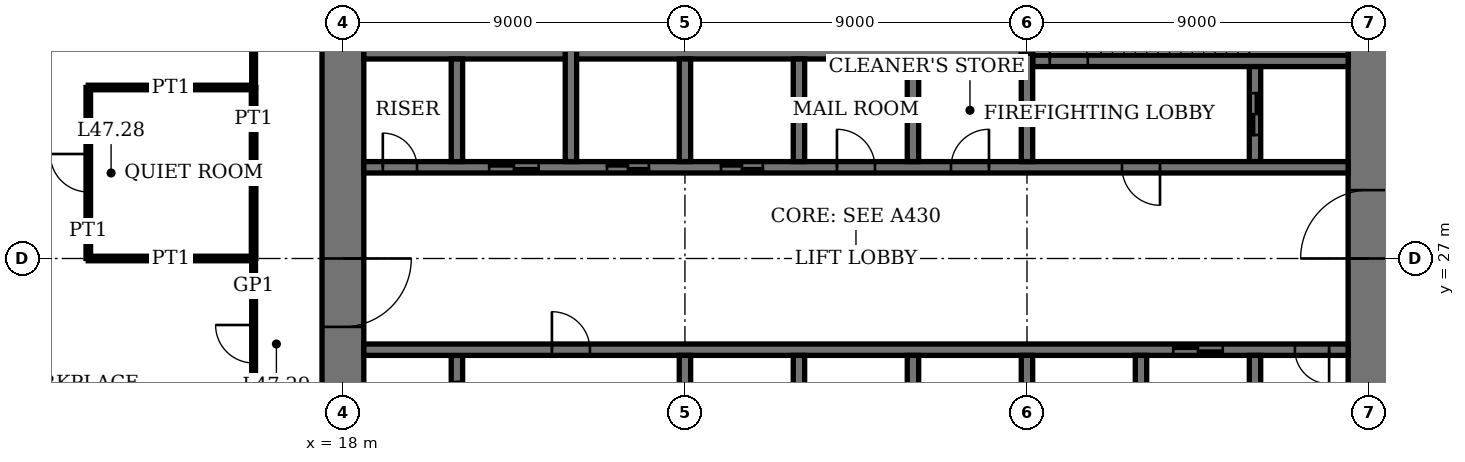
"""IFC4 building model, lengths in metres.
Left out: names, types, materials, properties, quantities, classifications, styles, units other than length and angle.
Written with IfcOpenShell. Run it as: python <this file> out.ifc"""

import sys

from ifc_helpers import new_model, si_unit, direction, frame, frame_2d, origin, place, context, subcontext, project, spatial, rectangle, extrude, element, fill, save


model = new_model("IFC4")
c1 = context("Model", 3, precision=1e-05, world=origin(), true_north=direction((0.0, 1.0)))
c2 = subcontext(c1, "Body", "Model", "MODEL_VIEW")
j1 = project(units=[si_unit("LENGTHUNIT", "METRE"), si_unit("PLANEANGLEUNIT", "RADIAN")], contexts=[c1])
p1 = place(None, origin())
s1 = spatial("IfcSite", under=j1, at=p1, CompositionType="ELEMENT")
p2 = place(p1, origin())
s2 = spatial("IfcBuilding", under=s1, at=p2, CompositionType="ELEMENT")
p3 = place(p2, frame((0.0, 0.0, 194.2)))
s3 = spatial("IfcBuildingStorey", under=s2, at=p3, CompositionType="ELEMENT", Elevation=194.2)
p4 = place(p3, frame((18.0, 35.45, 0.0), z_axis=(0.0, 0.0, 1.0), x_axis=(0.0, -1.0, 0.0)))
e1 = element("IfcWall", 1, at=p4, inside=s3, PredefinedType="SHEAR", context=c2, shape_type="SweptSolid", body=[
    extrude(rectangle(XDim=16.9, YDim=1.1, at=frame_2d((8.45, 0.0))), origin(), (0.0, 0.0, 1.0), 4.0),
])
p5 = place(p4, frame((8.45, 0.0, 0.0)))
e2 = element("IfcOpeningElement", 2, at=p5, cuts=e1, PredefinedType="OPENING", context=c2, shape_type="SweptSolid", body=[
    extrude(rectangle(XDim=1.8, YDim=2.4, at=frame_2d((0.9, 1.2))), frame((0.0, 0.56, 0.0), z_axis=(0.0, -1.0, 0.0), x_axis=(1.0, 0.0, 0.0)), (0.0, 0.0, 1.0), 1.12),
])
p6 = place(p3, frame((45.0, 18.55, 0.0), z_axis=(0.0, 0.0, 1.0), x_axis=(0.0, 1.0, 0.0)))
e3 = element("IfcWall", 3, at=p6, inside=s3, PredefinedType="SHEAR", context=c2, shape_type="SweptSolid", body=[
    extrude(rectangle(XDim=16.9, YDim=1.1, at=frame_2d((8.45, 0.0))), origin(), (0.0, 0.0, 1.0), 4.0),
])
p7 = place(p6, frame((8.45, 0.0, 0.0)))
e4 = element("IfcOpeningElement", 4, at=p7, cuts=e3, PredefinedType="OPENING", context=c2, shape_type="SweptSolid", body=[
    extrude(rectangle(XDim=1.8, YDim=2.4, at=frame_2d((0.9, 1.2))), frame((0.0, 0.56, 0.0), z_axis=(0.0, -1.0, 0.0), x_axis=(1.0, 0.0, 0.0)), (0.0, 0.0, 1.0), 1.12),
])
p8 = place(p3, frame((36.15, 32.2, 0.0), z_axis=(0.0, 0.0, 1.0), x_axis=(1.0, 0.0, 0.0)))
e5 = element("IfcWall", 5, at=p8, inside=s3, PredefinedType="SHEAR", context=c2, shape_type="SweptSolid", body=[
    extrude(rectangle(XDim=8.3, YDim=0.3, at=frame_2d((4.15, 0.0))), origin(), (0.0, 0.0, 1.0), 4.0),
])
p9 = place(p8, frame((0.45, 0.0, 0.0)))
e6 = element("IfcOpeningElement", 6, at=p9, cuts=e5, PredefinedType="OPENING", context=c2, shape_type="SweptSolid", body=[
    extrude(rectangle(XDim=1.0, YDim=2.4, at=frame_2d((0.5, 1.2))), frame((0.0, 0.16, 0.0), z_axis=(0.0, -1.0, 0.0), x_axis=(1.0, 0.0, 0.0)), (0.0, 0.0, 1.0), 0.32),
])
p10 = place(p3, frame((36.0, 32.4, 0.0), z_axis=(0.0, 0.0, 1.0), x_axis=(0.0, 1.0, 0.0)))
e7 = element("IfcWall", 7, at=p10, inside=s3, PredefinedType="SHEAR", context=c2, shape_type="SweptSolid", body=[
    extrude(rectangle(XDim=3.05, YDim=0.3, at=frame_2d((1.525, 0.0))), origin(), (0.0, 0.0, 1.0), 4.0),
])
p11 = place(p3, frame((21.0, 21.95, 0.0), z_axis=(0.0, 0.0, 1.0), x_axis=(0.0, 1.0, 0.0)))
e8 = element("IfcWall", 8, at=p11, inside=s3, PredefinedType="SHEAR", context=c2, shape_type="SweptSolid", body=[
    extrude(rectangle(XDim=2.5, YDim=0.3, at=frame_2d((1.25, 0.0))), origin(), (0.0, 0.0, 1.0), 4.0),
])
p12 = place(p11, frame((0.7, 0.0, 0.0)))
e9 = element("IfcOpeningElement", 9, at=p12, cuts=e8, PredefinedType="OPENING", context=c2, shape_type="SweptSolid", body=[
    extrude(rectangle(XDim=1.1, YDim=2.4, at=frame_2d((0.55, 1.2))), frame((0.0, 0.16, 0.0), z_axis=(0.0, -1.0, 0.0), x_axis=(1.0, 0.0, 0.0)), (0.0, 0.0, 1.0), 0.32),
])
p13 = place(p3, frame((42.0, 29.55, 0.0), z_axis=(0.0, 0.0, 1.0), x_axis=(0.0, 1.0, 0.0)))
e10 = element("IfcWall", 10, at=p13, inside=s3, PredefinedType="SHEAR", context=c2, shape_type="SweptSolid", body=[
    extrude(rectangle(XDim=2.5, YDim=0.3, at=frame_2d((1.25, 0.0))), origin(), (0.0, 0.0, 1.0), 4.0),
])
p14 = place(p13, frame((0.7, 0.0, 0.0)))
e11 = element("IfcOpeningElement", 11, at=p14, cuts=e10, PredefinedType="OPENING", context=c2, shape_type="SweptSolid", body=[
    extrude(rectangle(XDim=1.1, YDim=2.4, at=frame_2d((0.55, 1.2))), frame((0.0, 0.16, 0.0), z_axis=(0.0, -1.0, 0.0), x_axis=(1.0, 0.0, 0.0)), (0.0, 0.0, 1.0), 0.32),
])
p15 = place(p3, frame((18.55, 24.6, 0.0), z_axis=(0.0, 0.0, 1.0), x_axis=(1.0, 0.0, 0.0)))
e12 = element("IfcWall", 12, at=p15, inside=s3, PredefinedType="SHEAR", context=c2, shape_type="SweptSolid", body=[
    extrude(rectangle(XDim=25.9, YDim=0.3, at=frame_2d((12.95, 0.0))), origin(), (0.0, 0.0, 1.0), 4.0),
])
p16 = place(p15, frame((4.95, 0.0, 0.0)))
e13 = element("IfcOpeningElement", 13, at=p16, cuts=e12, PredefinedType="OPENING", context=c2, shape_type="SweptSolid", body=[
    extrude(rectangle(XDim=1.0, YDim=2.4, at=frame_2d((0.5, 1.2))), frame((0.0, 0.16, 0.0), z_axis=(0.0, -1.0, 0.0), x_axis=(1.0, 0.0, 0.0)), (0.0, 0.0, 1.0), 0.32),
])
p17 = place(p15, frame((24.5, 0.0, 0.0)))
e14 = element("IfcOpeningElement", 14, at=p17, cuts=e12, PredefinedType="OPENING", context=c2, shape_type="SweptSolid", body=[
    extrude(rectangle(XDim=0.9, YDim=2.1, at=frame_2d((0.45, 1.05))), frame((0.0, 0.16, 0.0), z_axis=(0.0, -1.0, 0.0), x_axis=(1.0, 0.0, 0.0)), (0.0, 0.0, 1.0), 0.32),
])
p18 = place(p15, frame((21.3, 0.0, 0.0)))
e15 = element("IfcOpeningElement", 15, at=p18, cuts=e12, PredefinedType="OPENING", context=c2, shape_type="SweptSolid", body=[
    extrude(rectangle(XDim=1.3, YDim=2.4, at=frame_2d((0.65, 1.2))), frame((0.0, 0.16, 0.0), z_axis=(0.0, -1.0, 0.0), x_axis=(1.0, 0.0, 0.0)), (0.0, 0.0, 1.0), 0.32),
])
p19 = place(p3, frame((18.55, 29.4, 0.0), z_axis=(0.0, 0.0, 1.0), x_axis=(1.0, 0.0, 0.0)))
e16 = element("IfcWall", 16, at=p19, inside=s3, PredefinedType="SHEAR", context=c2, shape_type="SweptSolid", body=[
    extrude(rectangle(XDim=25.9, YDim=0.3, at=frame_2d((12.95, 0.0))), origin(), (0.0, 0.0, 1.0), 4.0),
])
p20 = place(p19, frame((19.95, 0.0, 0.0)))
e17 = element("IfcOpeningElement", 17, at=p20, cuts=e16, PredefinedType="OPENING", context=c2, shape_type="SweptSolid", body=[
    extrude(rectangle(XDim=1.0, YDim=2.4, at=frame_2d((0.5, 1.2))), frame((0.0, 0.16, 0.0), z_axis=(0.0, -1.0, 0.0), x_axis=(1.0, 0.0, 0.0)), (0.0, 0.0, 1.0), 0.32),
])
p21 = place(p19, frame((0.5, 0.0, 0.0)))
e18 = element("IfcOpeningElement", 18, at=p21, cuts=e16, PredefinedType="OPENING", context=c2, shape_type="SweptSolid", body=[
    extrude(rectangle(XDim=0.9, YDim=2.1, at=frame_2d((0.45, 1.05))), frame((0.0, 0.16, 0.0), z_axis=(0.0, -1.0, 0.0), x_axis=(1.0, 0.0, 0.0)), (0.0, 0.0, 1.0), 0.32),
])
p22 = place(p19, frame((15.45, 0.0, 0.0)))
e19 = element("IfcOpeningElement", 19, at=p22, cuts=e16, PredefinedType="OPENING", context=c2, shape_type="SweptSolid", body=[
    extrude(rectangle(XDim=1.0, YDim=2.4, at=frame_2d((0.5, 1.2))), frame((0.0, 0.16, 0.0), z_axis=(0.0, -1.0, 0.0), x_axis=(1.0, 0.0, 0.0)), (0.0, 0.0, 1.0), 0.32),
])
p23 = place(p19, frame((12.45, 0.0, 0.0)))
e20 = element("IfcOpeningElement", 20, at=p23, cuts=e16, PredefinedType="OPENING", context=c2, shape_type="SweptSolid", body=[
    extrude(rectangle(XDim=1.0, YDim=2.4, at=frame_2d((0.5, 1.2))), frame((0.0, 0.16, 0.0), z_axis=(0.0, -1.0, 0.0), x_axis=(1.0, 0.0, 0.0)), (0.0, 0.0, 1.0), 0.32),
])
p24 = place(p19, frame((9.4, 0.0, 0.0)))
e21 = element("IfcOpeningElement", 21, at=p24, cuts=e16, PredefinedType="OPENING", context=c2, shape_type="SweptSolid", body=[
    extrude(rectangle(XDim=1.1, YDim=2.4, at=frame_2d((0.55, 1.2))), frame((0.0, 0.16, 0.0), z_axis=(0.0, -1.0, 0.0), x_axis=(1.0, 0.0, 0.0)), (0.0, 0.0, 1.0), 0.32),
])
p25 = place(p19, frame((6.4, 0.0, 0.0)))
e22 = element("IfcOpeningElement", 22, at=p25, cuts=e16, PredefinedType="OPENING", context=c2, shape_type="SweptSolid", body=[
    extrude(rectangle(XDim=1.1, YDim=2.4, at=frame_2d((0.55, 1.2))), frame((0.0, 0.16, 0.0), z_axis=(0.0, -1.0, 0.0), x_axis=(1.0, 0.0, 0.0)), (0.0, 0.0, 1.0), 0.32),
])
p26 = place(p19, frame((3.3, 0.0, 0.0)))
e23 = element("IfcOpeningElement", 23, at=p26, cuts=e16, PredefinedType="OPENING", context=c2, shape_type="SweptSolid", body=[
    extrude(rectangle(XDim=1.3, YDim=2.4, at=frame_2d((0.65, 1.2))), frame((0.0, 0.16, 0.0), z_axis=(0.0, -1.0, 0.0), x_axis=(1.0, 0.0, 0.0)), (0.0, 0.0, 1.0), 0.32),
])
p27 = place(p3, frame((18.55, 32.4, 0.0), z_axis=(0.0, 0.0, 1.0), x_axis=(1.0, 0.0, 0.0)))
e24 = element("IfcWall", 24, at=p27, inside=s3, PredefinedType="SHEAR", context=c2, shape_type="SweptSolid", body=[
    extrude(rectangle(XDim=17.3, YDim=0.3, at=frame_2d((8.65, 0.0))), origin(), (0.0, 0.0, 1.0), 4.0),
])
for number, where, z_axis, x_axis in (
    (25, (30.0, 21.75, 0.0), (0.0, 0.0, 1.0), (0.0, 1.0, 0.0)),
    (26, (33.0, 29.55, 0.0), (0.0, 0.0, 1.0), (0.0, 1.0, 0.0)),
    (27, (33.0, 21.75, 0.0), (0.0, 0.0, 1.0), (0.0, 1.0, 0.0)),
    (28, (30.0, 29.55, 0.0), (0.0, 0.0, 1.0), (0.0, 1.0, 0.0)),
    (29, (36.0, 21.75, 0.0), (0.0, 0.0, 1.0), (0.0, 1.0, 0.0)),
    (30, (27.0, 29.55, 0.0), (0.0, 0.0, 1.0), (0.0, 1.0, 0.0)),
):
    element("IfcWall", number, at=place(p3, frame(where, z_axis=z_axis, x_axis=x_axis)), inside=s3, PredefinedType="SHEAR", context=c2, shape_type="SweptSolid", body=[
        extrude(rectangle(XDim=2.7, YDim=0.3, at=frame_2d((1.35, 0.0))), origin(), (0.0, 0.0, 1.0), 4.0),
    ])
for number, where, z_axis, x_axis in (
    (31, (39.0, 18.55, 0.0), (0.0, 0.0, 1.0), (0.0, 1.0, 0.0)),
    (32, (24.0, 29.55, 0.0), (0.0, 0.0, 1.0), (0.0, 1.0, 0.0)),
):
    element("IfcWall", number, at=place(p3, frame(where, z_axis=z_axis, x_axis=x_axis)), inside=s3, PredefinedType="SHEAR", context=c2, shape_type="SweptSolid", body=[
        extrude(rectangle(XDim=5.9, YDim=0.3, at=frame_2d((2.95, 0.0))), origin(), (0.0, 0.0, 1.0), 4.0),
    ])
for number, where, z_axis, x_axis in (
    (33, (42.0, 21.75, 0.0), (0.0, 0.0, 1.0), (0.0, 1.0, 0.0)),
    (34, (21.0, 29.55, 0.0), (0.0, 0.0, 1.0), (0.0, 1.0, 0.0)),
):
    element("IfcWall", number, at=place(p3, frame(where, z_axis=z_axis, x_axis=x_axis)), inside=s3, PredefinedType="SHEAR", context=c2, shape_type="SweptSolid", body=[
        extrude(rectangle(XDim=2.7, YDim=0.3, at=frame_2d((1.35, 0.0))), origin(), (0.0, 0.0, 1.0), 4.0),
    ])
for number, where, z_axis, x_axis in (
    (35, (27.0, 21.6, 0.0), (0.0, 0.0, 1.0), (0.0, 1.0, 0.0)),
    (36, (36.0, 29.55, 0.0), (0.0, 0.0, 1.0), (0.0, 1.0, 0.0)),
):
    element("IfcWall", number, at=place(p3, frame(where, z_axis=z_axis, x_axis=x_axis)), inside=s3, PredefinedType="SHEAR", context=c2, shape_type="SweptSolid", body=[
        extrude(rectangle(XDim=2.85, YDim=0.3, at=frame_2d((1.425, 0.0))), origin(), (0.0, 0.0, 1.0), 4.0),
    ])
p28 = place(p3, frame((11.3, 27.0, 0.0), z_axis=(0.0, 0.0, 1.0), x_axis=(1.0, 0.0, 0.0)))
e37 = element("IfcWall", 37, at=p28, inside=s3, PredefinedType="PARTITIONING", context=c2, shape_type="SweptSolid", body=[
    extrude(rectangle(XDim=4.35, YDim=0.12, at=frame_2d((2.175, 0.0))), origin(), (0.0, 0.0, 1.0), 3.05),
])
p29 = place(p3, frame((11.3, 31.5, 0.0), z_axis=(0.0, 0.0, 1.0), x_axis=(1.0, 0.0, 0.0)))
e38 = element("IfcWall", 38, at=p29, inside=s3, PredefinedType="PARTITIONING", context=c2, shape_type="SweptSolid", body=[
    extrude(rectangle(XDim=4.35, YDim=0.12, at=frame_2d((2.175, 0.0))), origin(), (0.0, 0.0, 1.0), 3.1),
])
p30 = place(p3, frame((11.3, 27.0, 0.0), z_axis=(0.0, 0.0, 1.0), x_axis=(0.0, 1.0, 0.0)))
e39 = element("IfcWall", 39, at=p30, inside=s3, PredefinedType="PARTITIONING", context=c2, shape_type="SweptSolid", body=[
    extrude(rectangle(XDim=4.5, YDim=0.12, at=frame_2d((2.25, 0.0))), origin(), (0.0, 0.0, 1.0), 3.75),
])
p31 = place(p30, frame((1.75, 0.0, 0.0)))
e40 = element("IfcOpeningElement", 40, at=p31, cuts=e39, PredefinedType="OPENING", context=c2, shape_type="SweptSolid", body=[
    extrude(rectangle(XDim=1.0, YDim=2.4, at=frame_2d((0.5, 1.2))), frame((0.0, 0.07, 0.0), z_axis=(0.0, -1.0, 0.0), x_axis=(1.0, 0.0, 0.0)), (0.0, 0.0, 1.0), 0.14),
])
p32 = place(p3, frame((15.65, 27.0, 0.0), z_axis=(0.0, 0.0, 1.0), x_axis=(0.0, 1.0, 0.0)))
e41 = element("IfcWall", 41, at=p32, inside=s3, PredefinedType="PARTITIONING", context=c2, shape_type="SweptSolid", body=[
    extrude(rectangle(XDim=4.5, YDim=0.12, at=frame_2d((2.25, 0.0))), origin(), (0.0, 0.0, 1.0), 3.75),
])
p33 = place(p3, frame((15.65, 22.5, 0.0), z_axis=(0.0, 0.0, 1.0), x_axis=(0.0, 1.0, 0.0)))
e42 = element("IfcWall", 42, at=p33, inside=s3, PredefinedType="PARTITIONING", context=c2, shape_type="SweptSolid", body=[
    extrude(rectangle(XDim=4.5, YDim=0.1, at=frame_2d((2.25, 0.0))), origin(), (0.0, 0.0, 1.0), 3.75),
])
p34 = place(p33, frame((1.75, 0.0, 0.0)))
e43 = element("IfcOpeningElement", 43, at=p34, cuts=e42, PredefinedType="OPENING", context=c2, shape_type="SweptSolid", body=[
    extrude(rectangle(XDim=1.0, YDim=2.4, at=frame_2d((0.5, 1.2))), frame((0.0, 0.06, 0.0), z_axis=(0.0, -1.0, 0.0), x_axis=(1.0, 0.0, 0.0)), (0.0, 0.0, 1.0), 0.12),
])
p35 = place(p3, frame((15.65, 31.5, 0.0), z_axis=(0.0, 0.0, 1.0), x_axis=(0.0, 1.0, 0.0)))
e44 = element("IfcWall", 44, at=p35, inside=s3, PredefinedType="PARTITIONING", context=c2, shape_type="SweptSolid", body=[
    extrude(rectangle(XDim=6.85, YDim=0.1, at=frame_2d((3.425, 0.0))), origin(), (0.0, 0.0, 1.0), 3.75),
])
p36 = place(p5, origin())
e45 = element("IfcDoor", 45, at=p36, inside=s3, OperationType="DOUBLE_DOOR_DOUBLE_SWING", PredefinedType="DOOR", context=c2, shape_type="SweptSolid", body=[
    extrude(rectangle(XDim=1.8, YDim=2.4, at=frame_2d((0.9, 1.2))), frame((0.0, 0.03, 0.0), z_axis=(0.0, -1.0, 0.0), x_axis=(1.0, 0.0, 0.0)), (0.0, 0.0, 1.0), 0.06),
    extrude(rectangle(XDim=0.04, YDim=2.4, at=frame_2d((0.02, 1.2))), frame((0.0, 0.55, 0.0), z_axis=(0.0, -1.0, 0.0), x_axis=(1.0, 0.0, 0.0)), (0.0, 0.0, 1.0), 1.1),
    extrude(rectangle(XDim=0.04, YDim=2.4, at=frame_2d((1.78, 1.2))), frame((0.0, 0.55, 0.0), z_axis=(0.0, -1.0, 0.0), x_axis=(1.0, 0.0, 0.0)), (0.0, 0.0, 1.0), 1.1),
    extrude(rectangle(XDim=1.8, YDim=0.04, at=frame_2d((0.9, 2.38))), frame((0.0, 0.55, 0.0), z_axis=(0.0, -1.0, 0.0), x_axis=(1.0, 0.0, 0.0)), (0.0, 0.0, 1.0), 1.1),
])
fill(e2, e45)
p37 = place(p7, origin())
e46 = element("IfcDoor", 46, at=p37, inside=s3, OperationType="DOUBLE_DOOR_DOUBLE_SWING", PredefinedType="DOOR", context=c2, shape_type="SweptSolid", body=[
    extrude(rectangle(XDim=1.8, YDim=2.4, at=frame_2d((0.9, 1.2))), frame((0.0, 0.03, 0.0), z_axis=(0.0, -1.0, 0.0), x_axis=(1.0, 0.0, 0.0)), (0.0, 0.0, 1.0), 0.06),
    extrude(rectangle(XDim=0.04, YDim=2.4, at=frame_2d((0.02, 1.2))), frame((0.0, 0.55, 0.0), z_axis=(0.0, -1.0, 0.0), x_axis=(1.0, 0.0, 0.0)), (0.0, 0.0, 1.0), 1.1),
    extrude(rectangle(XDim=0.04, YDim=2.4, at=frame_2d((1.78, 1.2))), frame((0.0, 0.55, 0.0), z_axis=(0.0, -1.0, 0.0), x_axis=(1.0, 0.0, 0.0)), (0.0, 0.0, 1.0), 1.1),
    extrude(rectangle(XDim=1.8, YDim=0.04, at=frame_2d((0.9, 2.38))), frame((0.0, 0.55, 0.0), z_axis=(0.0, -1.0, 0.0), x_axis=(1.0, 0.0, 0.0)), (0.0, 0.0, 1.0), 1.1),
])
fill(e4, e46)
p38 = place(p9, origin())
e47 = element("IfcDoor", 47, at=p38, inside=s3, OperationType="SINGLE_SWING_RIGHT", PredefinedType="DOOR", context=c2, shape_type="SweptSolid", body=[
    extrude(rectangle(XDim=1.0, YDim=2.4, at=frame_2d((0.5, 1.2))), frame((0.0, 0.03, 0.0), z_axis=(0.0, -1.0, 0.0), x_axis=(1.0, 0.0, 0.0)), (0.0, 0.0, 1.0), 0.06),
])
fill(e6, e47)
p39 = place(p16, origin())
e48 = element("IfcDoor", 48, at=p39, inside=s3, OperationType="SINGLE_SWING_RIGHT", PredefinedType="DOOR", context=c2, shape_type="SweptSolid", body=[
    extrude(rectangle(XDim=1.0, YDim=2.4, at=frame_2d((0.5, 1.2))), frame((0.0, 0.03, 0.0), z_axis=(0.0, -1.0, 0.0), x_axis=(1.0, 0.0, 0.0)), (0.0, 0.0, 1.0), 0.06),
])
fill(e13, e48)
p40 = place(p20, origin())
e49 = element("IfcDoor", 49, at=p40, inside=s3, OperationType="SINGLE_SWING_RIGHT", PredefinedType="DOOR", context=c2, shape_type="SweptSolid", body=[
    extrude(rectangle(XDim=1.0, YDim=2.4, at=frame_2d((0.5, 1.2))), frame((0.0, 0.03, 0.0), z_axis=(0.0, -1.0, 0.0), x_axis=(1.0, 0.0, 0.0)), (0.0, 0.0, 1.0), 0.06),
])
fill(e17, e49)
p41 = place(p17, origin())
e50 = element("IfcDoor", 50, at=p41, inside=s3, OperationType="SINGLE_SWING_RIGHT", PredefinedType="DOOR", context=c2, shape_type="SweptSolid", body=[
    extrude(rectangle(XDim=0.9, YDim=2.1, at=frame_2d((0.45, 1.05))), frame((0.0, 0.03, 0.0), z_axis=(0.0, -1.0, 0.0), x_axis=(1.0, 0.0, 0.0)), (0.0, 0.0, 1.0), 0.06),
])
fill(e14, e50)
p42 = place(p21, origin())
e51 = element("IfcDoor", 51, at=p42, inside=s3, OperationType="SINGLE_SWING_RIGHT", PredefinedType="DOOR", context=c2, shape_type="SweptSolid", body=[
    extrude(rectangle(XDim=0.9, YDim=2.1, at=frame_2d((0.45, 1.05))), frame((0.0, 0.03, 0.0), z_axis=(0.0, -1.0, 0.0), x_axis=(1.0, 0.0, 0.0)), (0.0, 0.0, 1.0), 0.06),
])
fill(e18, e51)
p43 = place(p31, origin())
e52 = element("IfcDoor", 52, at=p43, inside=s3, OperationType="SINGLE_SWING_LEFT", PredefinedType="DOOR", context=c2, shape_type="SweptSolid", body=[
    extrude(rectangle(XDim=1.0, YDim=2.4, at=frame_2d((0.5, 1.2))), frame((0.0, 0.025, 0.0), z_axis=(0.0, -1.0, 0.0), x_axis=(1.0, 0.0, 0.0)), (0.0, 0.0, 1.0), 0.05),
])
fill(e40, e52)
p44 = place(p34, origin())
e53 = element("IfcDoor", 53, at=p44, inside=s3, OperationType="SINGLE_SWING_LEFT", PredefinedType="DOOR", context=c2, shape_type="SweptSolid", body=[
    extrude(rectangle(XDim=1.0, YDim=2.4, at=frame_2d((0.5, 1.2))), frame((0.0, 0.02, 0.0), z_axis=(0.0, -1.0, 0.0), x_axis=(1.0, 0.0, 0.0)), (0.0, 0.0, 1.0), 0.04),
])
fill(e43, e53)
p45 = place(p22, origin())
e54 = element("IfcDoor", 54, at=p45, inside=s3, OperationType="SINGLE_SWING_LEFT", PredefinedType="DOOR", context=c2, shape_type="SweptSolid", body=[
    extrude(rectangle(XDim=1.0, YDim=2.4, at=frame_2d((0.5, 1.2))), frame((0.0, 0.03, 0.0), z_axis=(0.0, -1.0, 0.0), x_axis=(1.0, 0.0, 0.0)), (0.0, 0.0, 1.0), 0.06),
])
fill(e19, e54)
p46 = place(p23, origin())
e55 = element("IfcDoor", 55, at=p46, inside=s3, OperationType="SINGLE_SWING_RIGHT", PredefinedType="DOOR", context=c2, shape_type="SweptSolid", body=[
    extrude(rectangle(XDim=1.0, YDim=2.4, at=frame_2d((0.5, 1.2))), frame((0.0, 0.03, 0.0), z_axis=(0.0, -1.0, 0.0), x_axis=(1.0, 0.0, 0.0)), (0.0, 0.0, 1.0), 0.06),
])
fill(e20, e55)
p47 = place(p24, origin())
e56 = element("IfcDoor", 56, at=p47, inside=s3, OperationType="DOUBLE_DOOR_SLIDING", PredefinedType="DOOR", context=c2, shape_type="SweptSolid", body=[
    extrude(rectangle(XDim=1.1, YDim=2.4, at=frame_2d((0.55, 1.2))), frame((0.0, 0.02, 0.0), z_axis=(0.0, -1.0, 0.0), x_axis=(1.0, 0.0, 0.0)), (0.0, 0.0, 1.0), 0.04),
])
fill(e21, e56)
p48 = place(p25, origin())
e57 = element("IfcDoor", 57, at=p48, inside=s3, OperationType="DOUBLE_DOOR_SLIDING", PredefinedType="DOOR", context=c2, shape_type="SweptSolid", body=[
    extrude(rectangle(XDim=1.1, YDim=2.4, at=frame_2d((0.55, 1.2))), frame((0.0, 0.02, 0.0), z_axis=(0.0, -1.0, 0.0), x_axis=(1.0, 0.0, 0.0)), (0.0, 0.0, 1.0), 0.04),
])
fill(e22, e57)
p49 = place(p18, origin())
e58 = element("IfcDoor", 58, at=p49, inside=s3, OperationType="DOUBLE_DOOR_SLIDING", PredefinedType="DOOR", context=c2, shape_type="SweptSolid", body=[
    extrude(rectangle(XDim=1.3, YDim=2.4, at=frame_2d((0.65, 1.2))), frame((0.0, 0.02, 0.0), z_axis=(0.0, -1.0, 0.0), x_axis=(1.0, 0.0, 0.0)), (0.0, 0.0, 1.0), 0.04),
])
fill(e15, e58)
p50 = place(p26, origin())
e59 = element("IfcDoor", 59, at=p50, inside=s3, OperationType="DOUBLE_DOOR_SLIDING", PredefinedType="DOOR", context=c2, shape_type="SweptSolid", body=[
    extrude(rectangle(XDim=1.3, YDim=2.4, at=frame_2d((0.65, 1.2))), frame((0.0, 0.02, 0.0), z_axis=(0.0, -1.0, 0.0), x_axis=(1.0, 0.0, 0.0)), (0.0, 0.0, 1.0), 0.04),
])
fill(e23, e59)
p51 = place(p14, origin())
e60 = element("IfcDoor", 60, at=p51, inside=s3, OperationType="DOUBLE_DOOR_SLIDING", PredefinedType="DOOR", context=c2, shape_type="SweptSolid", body=[
    extrude(rectangle(XDim=1.1, YDim=2.4, at=frame_2d((0.55, 1.2))), frame((0.0, 0.03, 0.0), z_axis=(0.0, -1.0, 0.0), x_axis=(1.0, 0.0, 0.0)), (0.0, 0.0, 1.0), 0.06),
])
fill(e11, e60)
save(model, sys.argv[1])
